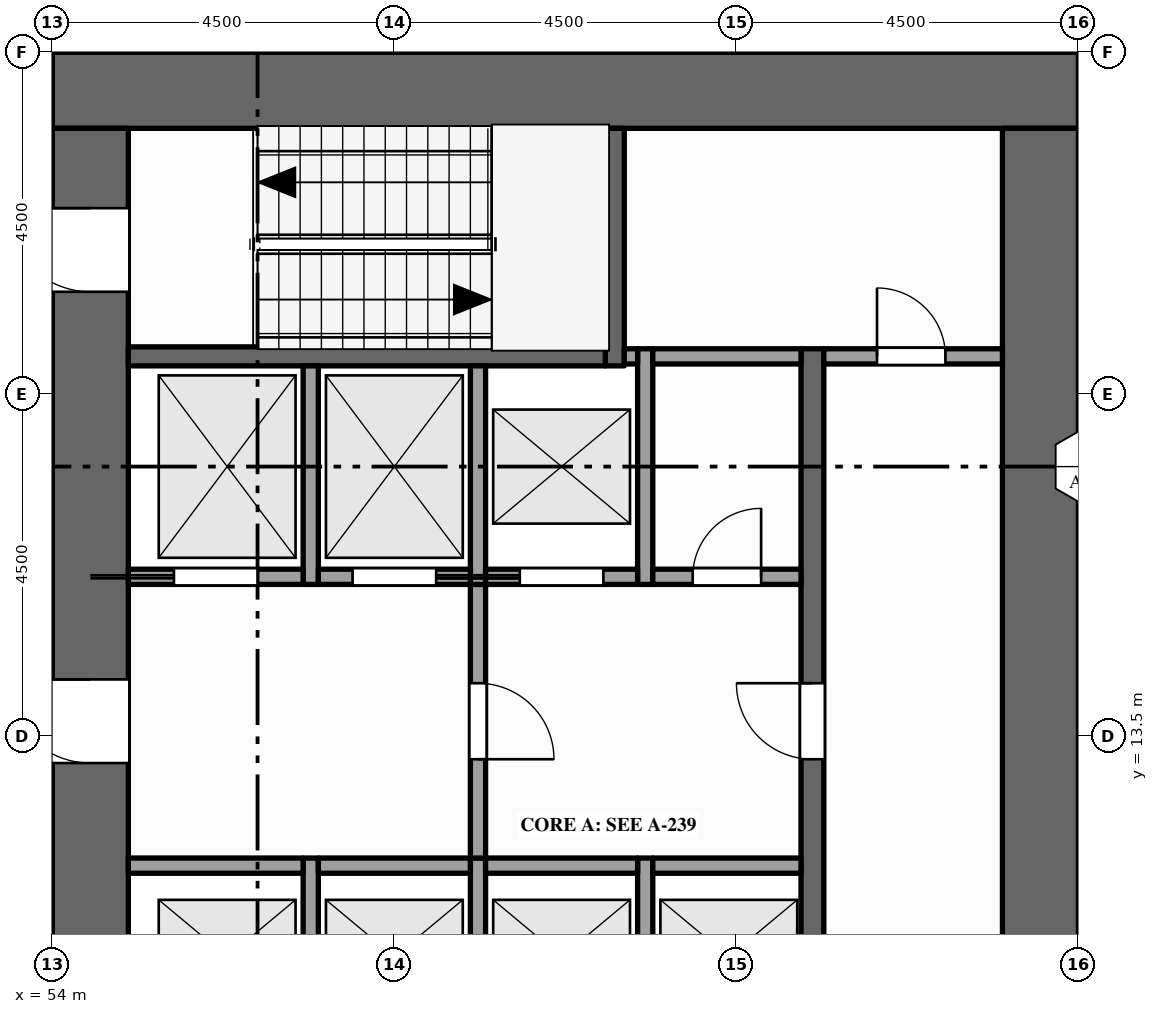
"""IFC4 building model, lengths in metres.
Left out: names, types, materials, properties, quantities, classifications, styles, units other than length and angle.
Written with IfcOpenShell. Run it as: python <this file> out.ifc"""

import sys

from ifc_helpers import new_model, si_unit, direction, frame, frame_2d, origin, place, context, subcontext, project, spatial, rectangle, extrude, element, fill, save


model = new_model("IFC4")
c1 = context("Model", 3, precision=1e-05, world=origin(), true_north=direction((0.0, 1.0)))
c2 = subcontext(c1, "Body", "Model", "MODEL_VIEW")
j1 = project(units=[si_unit("LENGTHUNIT", "METRE"), si_unit("PLANEANGLEUNIT", "RADIAN")], contexts=[c1])
p1 = place(None, origin())
s1 = spatial("IfcSite", under=j1, at=p1, CompositionType="ELEMENT")
p2 = place(p1, origin())
s2 = spatial("IfcBuilding", under=s1, at=p2, CompositionType="ELEMENT")
p3 = place(p2, frame((0.0, 0.0, 215.0)))
s3 = spatial("IfcBuildingStorey", under=s2, at=p3, CompositionType="ELEMENT", Elevation=215.0)
p4 = place(p3, frame((54.0, 22.0, -0.15), z_axis=(0.0, 0.0, 1.0), x_axis=(1.0, 0.0, 0.0)))
e1 = element("IfcWall", 1, at=p4, inside=s3, PredefinedType="SHEAR", context=c2, shape_type="SweptSolid", body=[
    extrude(rectangle(XDim=13.5, YDim=1.0, at=frame_2d((6.75, 0.0))), origin(), (0.0, 0.0, 1.0), 4.0),
])
p5 = place(p3, frame((54.5, 1.0, -0.15), z_axis=(0.0, 0.0, 1.0), x_axis=(0.0, 1.0, 0.0)))
e2 = element("IfcWall", 2, at=p5, inside=s3, PredefinedType="SHEAR", context=c2, shape_type="SweptSolid", body=[
    extrude(rectangle(XDim=20.5, YDim=1.0, at=frame_2d((10.25, 0.0))), origin(), (0.0, 0.0, 1.0), 4.0),
])
p6 = place(p5, frame((6.1, 0.0, 0.15)))
e3 = element("IfcOpeningElement", 3, at=p6, cuts=e2, PredefinedType="OPENING", context=c2, shape_type="SweptSolid", body=[
    extrude(rectangle(XDim=1.8, YDim=2.1, at=frame_2d((0.9, 1.05))), frame((0.0, 0.51, 0.0), z_axis=(0.0, -1.0, 0.0), x_axis=(1.0, 0.0, 0.0)), (0.0, 0.0, 1.0), 1.02),
])
p7 = place(p5, frame((12.15, 0.0, 0.15)))
e4 = element("IfcOpeningElement", 4, at=p7, cuts=e2, PredefinedType="OPENING", context=c2, shape_type="SweptSolid", body=[
    extrude(rectangle(XDim=1.1, YDim=2.1, at=frame_2d((0.55, 1.05))), frame((0.0, 0.51, 0.0), z_axis=(0.0, -1.0, 0.0), x_axis=(1.0, 0.0, 0.0)), (0.0, 0.0, 1.0), 1.02),
])
p8 = place(p5, frame((1.15, 0.0, 0.15)))
e5 = element("IfcOpeningElement", 5, at=p8, cuts=e2, PredefinedType="OPENING", context=c2, shape_type="SweptSolid", body=[
    extrude(rectangle(XDim=1.1, YDim=2.1, at=frame_2d((0.55, 1.05))), frame((0.0, 0.51, 0.0), z_axis=(0.0, -1.0, 0.0), x_axis=(1.0, 0.0, 0.0)), (0.0, 0.0, 1.0), 1.02),
])
p9 = place(p5, frame((18.35, 0.0, 0.15)))
e6 = element("IfcOpeningElement", 6, at=p9, cuts=e2, PredefinedType="OPENING", context=c2, shape_type="SweptSolid", body=[
    extrude(rectangle(XDim=1.1, YDim=2.1, at=frame_2d((0.55, 1.05))), frame((0.0, 0.51, 0.0), z_axis=(0.0, -1.0, 0.0), x_axis=(1.0, 0.0, 0.0)), (0.0, 0.0, 1.0), 1.02),
])
p10 = place(p3, frame((67.0, 1.0, -0.15), z_axis=(0.0, 0.0, 1.0), x_axis=(0.0, 1.0, 0.0)))
e7 = element("IfcWall", 7, at=p10, inside=s3, PredefinedType="SHEAR", context=c2, shape_type="SweptSolid", body=[
    extrude(rectangle(XDim=20.5, YDim=1.0, at=frame_2d((10.25, 0.0))), origin(), (0.0, 0.0, 1.0), 4.0),
])
p11 = place(p3, frame((57.4, 9.3, 0.0), z_axis=(0.0, 0.0, 1.0), x_axis=(0.0, 1.0, 0.0)))
e8 = element("IfcWall", 8, at=p11, inside=s3, PredefinedType="SOLIDWALL", context=c2, shape_type="SweptSolid", body=[
    extrude(rectangle(XDim=2.6, YDim=0.2, at=frame_2d((1.3, 0.0))), origin(), (0.0, 0.0, 1.0), 3.85),
])
p12 = place(p3, frame((57.4, 15.5, 0.0), z_axis=(0.0, 0.0, 1.0), x_axis=(0.0, 1.0, 0.0)))
e9 = element("IfcWall", 9, at=p12, inside=s3, PredefinedType="SOLIDWALL", context=c2, shape_type="SweptSolid", body=[
    extrude(rectangle(XDim=2.875, YDim=0.2, at=frame_2d((1.438, 0.0))), origin(), (0.0, 0.0, 1.0), 3.85),
])
p13 = place(p3, frame((59.6, 9.3, 0.0), z_axis=(0.0, 0.0, 1.0), x_axis=(0.0, 1.0, 0.0)))
e10 = element("IfcWall", 10, at=p13, inside=s3, PredefinedType="SOLIDWALL", context=c2, shape_type="SweptSolid", body=[
    extrude(rectangle(XDim=2.6, YDim=0.2, at=frame_2d((1.3, 0.0))), origin(), (0.0, 0.0, 1.0), 3.85),
])
p14 = place(p3, frame((59.6, 11.9, 0.0), z_axis=(0.0, 0.0, 1.0), x_axis=(0.0, 1.0, 0.0)))
e11 = element("IfcWall", 11, at=p14, inside=s3, PredefinedType="PARTITIONING", context=c2, shape_type="SweptSolid", body=[
    extrude(rectangle(XDim=3.6, YDim=0.2, at=frame_2d((1.8, 0.0))), origin(), (0.0, 0.0, 1.0), 3.85),
])
p15 = place(p14, frame((1.3, 0.0, 0.0)))
e12 = element("IfcOpeningElement", 12, at=p15, cuts=e11, PredefinedType="OPENING", context=c2, shape_type="SweptSolid", body=[
    extrude(rectangle(XDim=1.0, YDim=2.1, at=frame_2d((0.5, 1.05))), frame((0.0, 0.11, 0.0), z_axis=(0.0, -1.0, 0.0), x_axis=(1.0, 0.0, 0.0)), (0.0, 0.0, 1.0), 0.22),
])
p16 = place(p3, frame((59.6, 15.5, 0.0), z_axis=(0.0, 0.0, 1.0), x_axis=(0.0, 1.0, 0.0)))
e13 = element("IfcWall", 13, at=p16, inside=s3, PredefinedType="SOLIDWALL", context=c2, shape_type="SweptSolid", body=[
    extrude(rectangle(XDim=2.875, YDim=0.2, at=frame_2d((1.438, 0.0))), origin(), (0.0, 0.0, 1.0), 3.85),
])
p17 = place(p3, frame((61.4, 18.375, 0.0), z_axis=(0.0, 0.0, 1.0), x_axis=(0.0, 1.0, 0.0)))
e14 = element("IfcWall", 14, at=p17, inside=s3, PredefinedType="SHEAR", context=c2, shape_type="SweptSolid", body=[
    extrude(rectangle(XDim=3.125, YDim=0.25, at=frame_2d((1.562, 0.0))), origin(), (0.0, 0.0, 1.0), 3.85),
])
p18 = place(p3, frame((61.8, 9.3, 0.0), z_axis=(0.0, 0.0, 1.0), x_axis=(0.0, 1.0, 0.0)))
e15 = element("IfcWall", 15, at=p18, inside=s3, PredefinedType="SOLIDWALL", context=c2, shape_type="SweptSolid", body=[
    extrude(rectangle(XDim=2.6, YDim=0.2, at=frame_2d((1.3, 0.0))), origin(), (0.0, 0.0, 1.0), 3.85),
])
p19 = place(p3, frame((61.8, 15.5, 0.0), z_axis=(0.0, 0.0, 1.0), x_axis=(0.0, 1.0, 0.0)))
e16 = element("IfcWall", 16, at=p19, inside=s3, PredefinedType="SOLIDWALL", context=c2, shape_type="SweptSolid", body=[
    extrude(rectangle(XDim=3.1, YDim=0.2, at=frame_2d((1.55, 0.0))), origin(), (0.0, 0.0, 1.0), 3.85),
])
p20 = place(p3, frame((64.0, 4.1, 0.0), z_axis=(0.0, 0.0, 1.0), x_axis=(0.0, 1.0, 0.0)))
e17 = element("IfcWall", 17, at=p20, inside=s3, PredefinedType="SHEAR", context=c2, shape_type="SweptSolid", body=[
    extrude(rectangle(XDim=14.5, YDim=0.3, at=frame_2d((7.25, 0.0))), origin(), (0.0, 0.0, 1.0), 3.85),
])
p21 = place(p20, frame((3.4, 0.0, 0.0)))
e18 = element("IfcOpeningElement", 18, at=p21, cuts=e17, PredefinedType="OPENING", context=c2, shape_type="SweptSolid", body=[
    extrude(rectangle(XDim=1.0, YDim=2.1, at=frame_2d((0.5, 1.05))), frame((0.0, 0.16, 0.0), z_axis=(0.0, -1.0, 0.0), x_axis=(1.0, 0.0, 0.0)), (0.0, 0.0, 1.0), 0.32),
])
p22 = place(p20, frame((9.1, 0.0, 0.0)))
e19 = element("IfcOpeningElement", 19, at=p22, cuts=e17, PredefinedType="OPENING", context=c2, shape_type="SweptSolid", body=[
    extrude(rectangle(XDim=1.0, YDim=2.1, at=frame_2d((0.5, 1.05))), frame((0.0, 0.16, 0.0), z_axis=(0.0, -1.0, 0.0), x_axis=(1.0, 0.0, 0.0)), (0.0, 0.0, 1.0), 0.32),
])
p23 = place(p3, frame((55.0, 11.8, 0.0), z_axis=(0.0, 0.0, 1.0), x_axis=(1.0, 0.0, 0.0)))
e20 = element("IfcWall", 20, at=p23, inside=s3, PredefinedType="SOLIDWALL", context=c2, shape_type="SweptSolid", body=[
    extrude(rectangle(XDim=2.3, YDim=0.2, at=frame_2d((1.15, 0.0))), origin(), (0.0, 0.0, 1.0), 3.85),
])
for number, where, z_axis, x_axis in (
    (21, (57.5, 11.8, 0.0), (0.0, 0.0, 1.0), (1.0, 0.0, 0.0)),
    (22, (59.7, 11.8, 0.0), (0.0, 0.0, 1.0), (1.0, 0.0, 0.0)),
):
    element("IfcWall", number, at=place(p3, frame(where, z_axis=z_axis, x_axis=x_axis)), inside=s3, PredefinedType="SOLIDWALL", context=c2, shape_type="SweptSolid", body=[
        extrude(rectangle(XDim=2.0, YDim=0.2, at=frame_2d((1.0, 0.0))), origin(), (0.0, 0.0, 1.0), 3.85),
    ])
p24 = place(p3, frame((61.9, 11.8, 0.0), z_axis=(0.0, 0.0, 1.0), x_axis=(1.0, 0.0, 0.0)))
e23 = element("IfcWall", 23, at=p24, inside=s3, PredefinedType="SOLIDWALL", context=c2, shape_type="SweptSolid", body=[
    extrude(rectangle(XDim=1.95, YDim=0.2, at=frame_2d((0.975, 0.0))), origin(), (0.0, 0.0, 1.0), 3.85),
])
p25 = place(p3, frame((55.0, 15.6, 0.0), z_axis=(0.0, 0.0, 1.0), x_axis=(1.0, 0.0, 0.0)))
e24 = element("IfcWall", 24, at=p25, inside=s3, PredefinedType="SOLIDWALL", context=c2, shape_type="SweptSolid", body=[
    extrude(rectangle(XDim=2.3, YDim=0.2, at=frame_2d((1.15, 0.0))), origin(), (0.0, 0.0, 1.0), 3.85),
])
p26 = place(p25, frame((0.6, 0.0, 0.012)))
e25 = element("IfcOpeningElement", 25, at=p26, cuts=e24, PredefinedType="OPENING", context=c2, shape_type="SweptSolid", body=[
    extrude(rectangle(XDim=1.1, YDim=2.1, at=frame_2d((0.55, 1.05))), frame((0.0, 0.11, 0.0), z_axis=(0.0, -1.0, 0.0), x_axis=(1.0, 0.0, 0.0)), (0.0, 0.0, 1.0), 0.22),
])
p27 = place(p3, frame((57.5, 15.6, 0.0), z_axis=(0.0, 0.0, 1.0), x_axis=(1.0, 0.0, 0.0)))
e26 = element("IfcWall", 26, at=p27, inside=s3, PredefinedType="SOLIDWALL", context=c2, shape_type="SweptSolid", body=[
    extrude(rectangle(XDim=2.0, YDim=0.2, at=frame_2d((1.0, 0.0))), origin(), (0.0, 0.0, 1.0), 3.85),
])
p28 = place(p27, frame((0.45, 0.0, 0.012)))
e27 = element("IfcOpeningElement", 27, at=p28, cuts=e26, PredefinedType="OPENING", context=c2, shape_type="SweptSolid", body=[
    extrude(rectangle(XDim=1.1, YDim=2.1, at=frame_2d((0.55, 1.05))), frame((0.0, 0.11, 0.0), z_axis=(0.0, -1.0, 0.0), x_axis=(1.0, 0.0, 0.0)), (0.0, 0.0, 1.0), 0.22),
])
p29 = place(p3, frame((59.7, 15.6, 0.0), z_axis=(0.0, 0.0, 1.0), x_axis=(1.0, 0.0, 0.0)))
e28 = element("IfcWall", 28, at=p29, inside=s3, PredefinedType="SOLIDWALL", context=c2, shape_type="SweptSolid", body=[
    extrude(rectangle(XDim=2.0, YDim=0.2, at=frame_2d((1.0, 0.0))), origin(), (0.0, 0.0, 1.0), 3.85),
])
p30 = place(p29, frame((0.45, 0.0, 0.012)))
e29 = element("IfcOpeningElement", 29, at=p30, cuts=e28, PredefinedType="OPENING", context=c2, shape_type="SweptSolid", body=[
    extrude(rectangle(XDim=1.1, YDim=2.1, at=frame_2d((0.55, 1.05))), frame((0.0, 0.11, 0.0), z_axis=(0.0, -1.0, 0.0), x_axis=(1.0, 0.0, 0.0)), (0.0, 0.0, 1.0), 0.22),
])
p31 = place(p3, frame((61.9, 15.6, 0.0), z_axis=(0.0, 0.0, 1.0), x_axis=(1.0, 0.0, 0.0)))
e30 = element("IfcWall", 30, at=p31, inside=s3, PredefinedType="PARTITIONING", context=c2, shape_type="SweptSolid", body=[
    extrude(rectangle(XDim=1.95, YDim=0.2, at=frame_2d((0.975, 0.0))), origin(), (0.0, 0.0, 1.0), 3.85),
])
p32 = place(p31, frame((0.525, 0.0, 0.0)))
e31 = element("IfcOpeningElement", 31, at=p32, cuts=e30, PredefinedType="OPENING", context=c2, shape_type="SweptSolid", body=[
    extrude(rectangle(XDim=0.9, YDim=2.1, at=frame_2d((0.45, 1.05))), frame((0.0, 0.11, 0.0), z_axis=(0.0, -1.0, 0.0), x_axis=(1.0, 0.0, 0.0)), (0.0, 0.0, 1.0), 0.22),
])
p33 = place(p3, frame((55.0, 18.5, 0.0), z_axis=(0.0, 0.0, 1.0), x_axis=(1.0, 0.0, 0.0)))
e32 = element("IfcWall", 32, at=p33, inside=s3, PredefinedType="SHEAR", context=c2, shape_type="SweptSolid", body=[
    extrude(rectangle(XDim=6.275, YDim=0.25, at=frame_2d((3.137, 0.0))), origin(), (0.0, 0.0, 1.0), 3.85),
])
p34 = place(p3, frame((61.525, 18.5, 0.0), z_axis=(0.0, 0.0, 1.0), x_axis=(1.0, 0.0, 0.0)))
e33 = element("IfcWall", 33, at=p34, inside=s3, PredefinedType="SOLIDWALL", context=c2, shape_type="SweptSolid", body=[
    extrude(rectangle(XDim=0.175, YDim=0.2, at=frame_2d((0.087, 0.0))), origin(), (0.0, 0.0, 1.0), 3.85),
])
p35 = place(p3, frame((61.9, 18.5, 0.0), z_axis=(0.0, 0.0, 1.0), x_axis=(1.0, 0.0, 0.0)))
e34 = element("IfcWall", 34, at=p35, inside=s3, PredefinedType="PARTITIONING", context=c2, shape_type="SweptSolid", body=[
    extrude(rectangle(XDim=1.95, YDim=0.2, at=frame_2d((0.975, 0.0))), origin(), (0.0, 0.0, 1.0), 3.85),
])
p36 = place(p3, frame((64.15, 18.5, 0.0), z_axis=(0.0, 0.0, 1.0), x_axis=(1.0, 0.0, 0.0)))
e35 = element("IfcWall", 35, at=p36, inside=s3, PredefinedType="PARTITIONING", context=c2, shape_type="SweptSolid", body=[
    extrude(rectangle(XDim=2.35, YDim=0.2, at=frame_2d((1.175, 0.0))), origin(), (0.0, 0.0, 1.0), 3.85),
])
p37 = place(p36, frame((0.7, 0.0, 0.0)))
e36 = element("IfcOpeningElement", 36, at=p37, cuts=e35, PredefinedType="OPENING", context=c2, shape_type="SweptSolid", body=[
    extrude(rectangle(XDim=0.9, YDim=2.1, at=frame_2d((0.45, 1.05))), frame((0.0, 0.11, 0.0), z_axis=(0.0, -1.0, 0.0), x_axis=(1.0, 0.0, 0.0)), (0.0, 0.0, 1.0), 0.22),
])
p38 = place(p26, origin())
e37 = element("IfcDoor", 37, at=p38, inside=s3, OperationType="SLIDING_TO_LEFT", PredefinedType="DOOR", context=c2, shape_type="SweptSolid", body=[
    extrude(rectangle(XDim=1.1, YDim=2.1, at=frame_2d((0.55, 1.05))), frame((0.0, 0.025, 0.0), z_axis=(0.0, -1.0, 0.0), x_axis=(1.0, 0.0, 0.0)), (0.0, 0.0, 1.0), 0.05),
])
fill(e25, e37)
p39 = place(p28, origin())
e38 = element("IfcDoor", 38, at=p39, inside=s3, OperationType="SLIDING_TO_RIGHT", PredefinedType="DOOR", context=c2, shape_type="SweptSolid", body=[
    extrude(rectangle(XDim=1.1, YDim=2.1, at=frame_2d((0.55, 1.05))), frame((0.0, 0.025, 0.0), z_axis=(0.0, -1.0, 0.0), x_axis=(1.0, 0.0, 0.0)), (0.0, 0.0, 1.0), 0.05),
])
fill(e27, e38)
p40 = place(p30, origin())
e39 = element("IfcDoor", 39, at=p40, inside=s3, OperationType="SLIDING_TO_LEFT", PredefinedType="DOOR", context=c2, shape_type="SweptSolid", body=[
    extrude(rectangle(XDim=1.1, YDim=2.1, at=frame_2d((0.55, 1.05))), frame((0.0, 0.025, 0.0), z_axis=(0.0, -1.0, 0.0), x_axis=(1.0, 0.0, 0.0)), (0.0, 0.0, 1.0), 0.05),
])
fill(e29, e39)
p41 = place(p7, origin())
e40 = element("IfcDoor", 40, at=p41, inside=s3, OperationType="SINGLE_SWING_RIGHT", PredefinedType="DOOR", context=c2, shape_type="SweptSolid", body=[
    extrude(rectangle(XDim=1.1, YDim=2.1, at=frame_2d((0.55, 1.05))), frame((0.0, 0.025, 0.0), z_axis=(0.0, -1.0, 0.0), x_axis=(1.0, 0.0, 0.0)), (0.0, 0.0, 1.0), 0.05),
])
fill(e4, e40)
p42 = place(p15, origin())
e41 = element("IfcDoor", 41, at=p42, inside=s3, OperationType="SINGLE_SWING_LEFT", PredefinedType="DOOR", context=c2, shape_type="SweptSolid", body=[
    extrude(rectangle(XDim=1.0, YDim=2.1, at=frame_2d((0.5, 1.05))), frame((0.0, 0.025, 0.0), z_axis=(0.0, -1.0, 0.0), x_axis=(1.0, 0.0, 0.0)), (0.0, 0.0, 1.0), 0.05),
])
fill(e12, e41)
p43 = place(p22, origin())
e42 = element("IfcDoor", 42, at=p43, inside=s3, OperationType="SINGLE_SWING_RIGHT", PredefinedType="DOOR", context=c2, shape_type="SweptSolid", body=[
    extrude(rectangle(XDim=1.0, YDim=2.1, at=frame_2d((0.5, 1.05))), frame((0.0, 0.025, 0.0), z_axis=(0.0, -1.0, 0.0), x_axis=(1.0, 0.0, 0.0)), (0.0, 0.0, 1.0), 0.05),
])
fill(e19, e42)
p44 = place(p9, origin())
e43 = element("IfcDoor", 43, at=p44, inside=s3, OperationType="SINGLE_SWING_RIGHT", PredefinedType="DOOR", context=c2, shape_type="SweptSolid", body=[
    extrude(rectangle(XDim=1.1, YDim=2.1, at=frame_2d((0.55, 1.05))), frame((0.0, 0.025, 0.0), z_axis=(0.0, -1.0, 0.0), x_axis=(1.0, 0.0, 0.0)), (0.0, 0.0, 1.0), 0.05),
])
fill(e6, e43)
p45 = place(p37, origin())
e44 = element("IfcDoor", 44, at=p45, inside=s3, OperationType="SINGLE_SWING_LEFT", PredefinedType="DOOR", context=c2, shape_type="SweptSolid", body=[
    extrude(rectangle(XDim=0.9, YDim=2.1, at=frame_2d((0.45, 1.05))), frame((0.0, 0.025, 0.0), z_axis=(0.0, -1.0, 0.0), x_axis=(1.0, 0.0, 0.0)), (0.0, 0.0, 1.0), 0.05),
])
fill(e36, e44)
p46 = place(p32, origin())
e45 = element("IfcDoor", 45, at=p46, inside=s3, OperationType="SINGLE_SWING_RIGHT", PredefinedType="DOOR", context=c2, shape_type="SweptSolid", body=[
    extrude(rectangle(XDim=0.9, YDim=2.1, at=frame_2d((0.45, 1.05))), frame((0.0, 0.025, 0.0), z_axis=(0.0, -1.0, 0.0), x_axis=(1.0, 0.0, 0.0)), (0.0, 0.0, 1.0), 0.05),
])
fill(e31, e45)
save(model, sys.argv[1])
